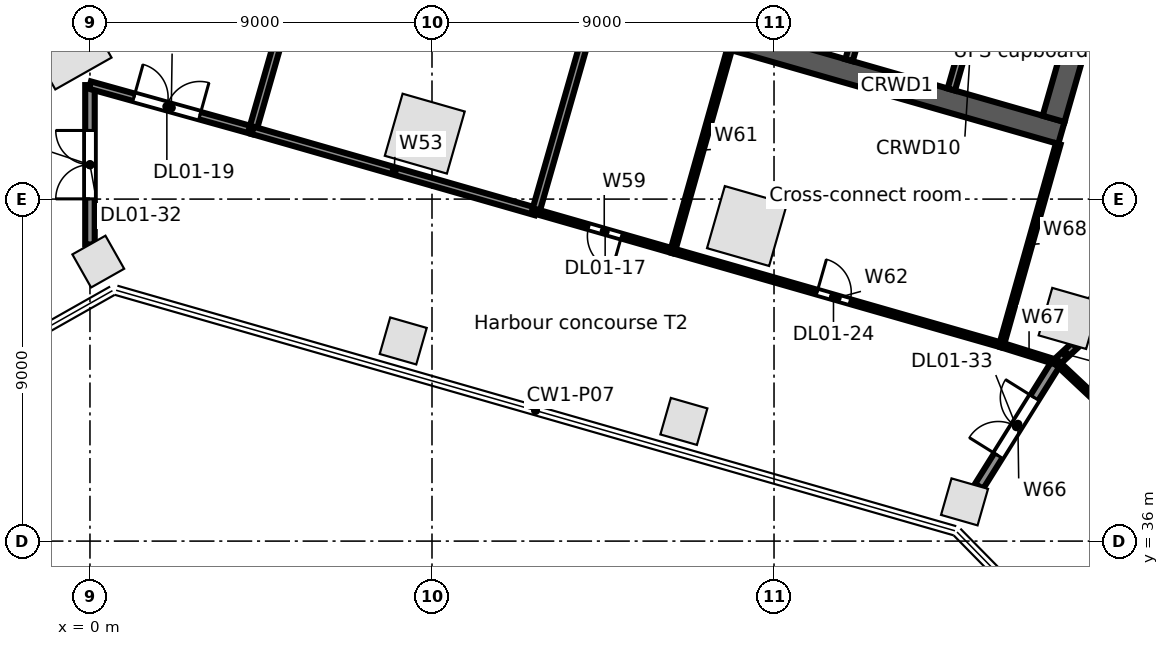
"""IFC4 building model, lengths in metres.
Left out: names, types, materials, properties, quantities, classifications, styles, units other than length and angle.
Written with IfcOpenShell. Run it as: python <this file> out.ifc"""

import sys

from ifc_helpers import new_model, si_unit, direction, frame, frame_2d, origin, origin_2d, place, context, subcontext, project, spatial, rectangle, extrude, element, fill, save


model = new_model("IFC4")
c1 = context("Model", 3, precision=1e-05, world=origin(), true_north=direction((0.0, 1.0)))
c2 = subcontext(c1, "Body", "Model", "MODEL_VIEW")
j1 = project(units=[si_unit("LENGTHUNIT", "METRE"), si_unit("PLANEANGLEUNIT", "RADIAN")], contexts=[c1])
p1 = place(None, origin())
s1 = spatial("IfcSite", under=j1, at=p1, CompositionType="ELEMENT")
p2 = place(p1, origin())
s2 = spatial("IfcBuilding", under=s1, at=p2, CompositionType="ELEMENT")
p3 = place(p2, frame((0.0, 0.0, 6.5)))
s3 = spatial("IfcBuildingStorey", under=s2, at=p3, CompositionType="ELEMENT", Elevation=6.5)
for number, where, z_axis, x_axis in (
    (1, (-0.591, 49.044, 0.0), (0.0, 0.0, 1.0), (0.87, 0.492, 0.0)),
    (2, (8.81, 46.722, 0.0), (0.0, 0.0, 1.0), (0.961, -0.276, 0.0)),
    (3, (17.288, 44.291, 0.0), (0.0, 0.0, 1.0), (0.961, -0.276, 0.0)),
):
    element("IfcColumn", number, at=place(p3, frame(where, z_axis=z_axis, x_axis=x_axis)), inside=s3, PredefinedType="COLUMN", context=c2, shape_type="SweptSolid", body=[
        extrude(rectangle(XDim=1.7, YDim=1.7, at=origin_2d()), origin(), (0.0, 0.0, 1.0), 5.0),
    ])
p4 = place(p3, frame((25.767, 41.86, 0.0), z_axis=(0.0, 0.0, 1.0), x_axis=(0.961261695938, -0.275637355817, 0.0)))
e4 = element("IfcColumn", 4, at=p4, inside=s3, PredefinedType="COLUMN", context=c2, shape_type="SweptSolid", body=[
    extrude(rectangle(XDim=1.3, YDim=1.3, at=origin_2d()), origin(), (0.0, 0.0, 1.0), 5.0),
])
for number, where, z_axis, x_axis in (
    (5, (0.219, 43.355, 0.0), (0.0, 0.0, 1.0), (0.87, 0.492, 0.0)),
    (6, (8.243, 41.267, 0.0), (0.0, 0.0, 1.0), (0.961, -0.276, 0.0)),
    (7, (15.628, 39.149, 0.0), (0.0, 0.0, 1.0), (0.961, -0.276, 0.0)),
    (8, (23.013, 37.032, 0.0), (0.0, 0.0, 1.0), (0.961, -0.276, 0.0)),
):
    element("IfcColumn", number, at=place(p3, frame(where, z_axis=z_axis, x_axis=x_axis)), inside=s3, PredefinedType="COLUMN", context=c2, shape_type="SweptSolid", body=[
        extrude(rectangle(XDim=1.0, YDim=1.0, at=origin_2d()), origin(), (0.0, 0.0, 1.0), 5.0),
    ])
p5 = place(p3, frame((16.911, 49.221, 0.0), z_axis=(0.0, 0.0, 1.0), x_axis=(0.96126248289, -0.275634611374, 0.0)))
e9 = element("IfcWall", 9, at=p5, inside=s3, PredefinedType="SOLIDWALL", context=c2, shape_type="SweptSolid", body=[
    extrude(rectangle(XDim=9.0, YDim=0.6, at=frame_2d((4.5, 0.0))), origin(), (0.0, 0.0, 1.0), 4.65),
])
p6 = place(p3, frame((19.973, 48.655, 0.0), z_axis=(0.0, 0.0, 1.0), x_axis=(0.275668441653, 0.961252781674, 0.0)))
e10 = element("IfcWall", 10, at=p6, inside=s3, PredefinedType="SOLIDWALL", context=c2, shape_type="SweptSolid", body=[
    extrude(rectangle(XDim=4.05, YDim=0.2, at=frame_2d((2.025, 0.0))), origin(), (0.0, 0.0, 1.0), 4.65),
])
p7 = place(p3, frame((22.665, 47.883, 0.0), z_axis=(0.0, 0.0, 1.0), x_axis=(0.275596769212, 0.961273333033, 0.0)))
e11 = element("IfcWall", 11, at=p7, inside=s3, PredefinedType="PARTITIONING", context=c2, shape_type="SweptSolid", body=[
    extrude(rectangle(XDim=4.05, YDim=0.2, at=frame_2d((2.025, 0.0))), origin(), (0.0, 0.0, 1.0), 4.65),
])
p8 = place(p3, frame((25.356, 47.112, 0.0), z_axis=(0.0, 0.0, 1.0), x_axis=(0.275631631629, 0.961263337304, 0.0)))
e12 = element("IfcWall", 12, at=p8, inside=s3, PredefinedType="SOLIDWALL", context=c2, shape_type="SweptSolid", body=[
    extrude(rectangle(XDim=10.8, YDim=0.6, at=frame_2d((5.4, 0.0))), origin(), (0.0, 0.0, 1.0), 4.65),
])
p9 = place(p8, frame((4.8, 0.0, 0.0)))
e13 = element("IfcOpeningElement", 13, at=p9, cuts=e12, PredefinedType="OPENING", context=c2, shape_type="SweptSolid", body=[
    extrude(rectangle(XDim=1.2, YDim=2.1, at=frame_2d((0.6, 1.05))), frame((0.0, 0.31, 0.0), z_axis=(0.0, -1.0, 0.0), x_axis=(1.0, 0.0, 0.0)), (0.0, 0.0, 1.0), 0.62),
])
p10 = place(p3, frame((0.0, 43.806, 0.0), z_axis=(0.0, 0.0, 1.0), x_axis=(0.0, 1.0, 0.0)))
e14 = element("IfcWall", 14, at=p10, inside=s3, PredefinedType="PARTITIONING", context=c2, shape_type="SweptSolid", body=[
    extrude(rectangle(XDim=4.194, YDim=0.25, at=frame_2d((2.097, 0.0))), origin(), (0.0, 0.0, 1.0), 3.712),
])
p11 = place(p10, frame((1.2, 0.0, 0.0)))
e15 = element("IfcOpeningElement", 15, at=p11, cuts=e14, PredefinedType="OPENING", context=c2, shape_type="SweptSolid", body=[
    extrude(rectangle(XDim=1.8, YDim=2.1, at=frame_2d((0.9, 1.05))), frame((0.0, 0.135, 0.0), z_axis=(0.0, -1.0, 0.0), x_axis=(1.0, 0.0, 0.0)), (0.0, 0.0, 1.0), 0.27),
])
p12 = place(p3, frame((0.0, 48.0, 0.0), z_axis=(0.0, 0.0, 1.0), x_axis=(0.963400508162, -0.268066150181, 0.0)))
e16 = element("IfcWall", 16, at=p12, inside=s3, PredefinedType="PARTITIONING", context=c2, shape_type="SweptSolid", body=[
    extrude(rectangle(XDim=4.443, YDim=0.2, at=frame_2d((2.221, 0.0))), origin(), (0.0, 0.0, 1.0), 4.65),
])
p13 = place(p12, frame((1.2, 0.0, 0.0)))
e17 = element("IfcOpeningElement", 17, at=p13, cuts=e16, PredefinedType="OPENING", context=c2, shape_type="SweptSolid", body=[
    extrude(rectangle(XDim=1.8, YDim=2.1, at=frame_2d((0.9, 1.05))), frame((0.0, 0.11, 0.0), z_axis=(0.0, -1.0, 0.0), x_axis=(1.0, 0.0, 0.0)), (0.0, 0.0, 1.0), 0.22),
])
p14 = place(p3, frame((4.28, 46.809, 0.0), z_axis=(0.0, 0.0, 1.0), x_axis=(0.275635044812, 0.961262358605, 0.0)))
e18 = element("IfcWall", 18, at=p14, inside=s3, PredefinedType="PARTITIONING", context=c2, shape_type="SweptSolid", body=[
    extrude(rectangle(XDim=11.5, YDim=0.2, at=frame_2d((5.75, 0.0))), origin(), (0.0, 0.0, 1.0), 3.712),
])
p15 = place(p3, frame((4.28, 46.809, 0.0), z_axis=(0.0, 0.0, 1.0), x_axis=(0.961270337968, -0.275607215693, 0.0)))
e19 = element("IfcWall", 19, at=p15, inside=s3, PredefinedType="PARTITIONING", context=c2, shape_type="SweptSolid", body=[
    extrude(rectangle(XDim=7.75, YDim=0.2, at=frame_2d((3.875, 0.0))), origin(), (0.0, 0.0, 1.0), 4.03),
])
p16 = place(p3, frame((11.73, 44.673, 0.0), z_axis=(0.0, 0.0, 1.0), x_axis=(0.275635044812, 0.961262358605, 0.0)))
e20 = element("IfcWall", 20, at=p16, inside=s3, PredefinedType="PARTITIONING", context=c2, shape_type="SweptSolid", body=[
    extrude(rectangle(XDim=11.5, YDim=0.2, at=frame_2d((5.75, 0.0))), origin(), (0.0, 0.0, 1.0), 3.712),
])
p17 = place(p16, frame((4.95, 0.0, 0.0)))
e21 = element("IfcOpeningElement", 21, at=p17, cuts=e20, PredefinedType="OPENING", context=c2, shape_type="SweptSolid", body=[
    extrude(rectangle(XDim=1.8, YDim=2.1, at=frame_2d((0.9, 1.05))), frame((0.0, 0.11, 0.0), z_axis=(0.0, -1.0, 0.0), x_axis=(1.0, 0.0, 0.0)), (0.0, 0.0, 1.0), 0.22),
])
p18 = place(p3, frame((11.73, 44.673, 0.0), z_axis=(0.0, 0.0, 1.0), x_axis=(0.961228613303, -0.275752702557, 0.0)))
e22 = element("IfcWall", 22, at=p18, inside=s3, PredefinedType="PARTITIONING", context=c2, shape_type="SweptSolid", body=[
    extrude(rectangle(XDim=3.75, YDim=0.125, at=frame_2d((1.875, 0.0))), origin(), (0.0, 0.0, 1.0), 4.65),
])
p19 = place(p18, frame((1.45, 0.0, 0.0)))
e23 = element("IfcOpeningElement", 23, at=p19, cuts=e22, PredefinedType="OPENING", context=c2, shape_type="SweptSolid", body=[
    extrude(rectangle(XDim=0.9, YDim=2.1, at=frame_2d((0.45, 1.05))), frame((0.0, 0.073, 0.0), z_axis=(0.0, -1.0, 0.0), x_axis=(1.0, 0.0, 0.0)), (0.0, 0.0, 1.0), 0.145),
])
p20 = place(p3, frame((15.335, 43.639, 0.0), z_axis=(0.0, 0.0, 1.0), x_axis=(0.271407455373, 0.962464541252, 0.0)))
e24 = element("IfcWall", 24, at=p20, inside=s3, PredefinedType="PARTITIONING", context=c2, shape_type="SweptSolid", body=[
    extrude(rectangle(XDim=5.501, YDim=0.125, at=frame_2d((2.75, 0.0))), origin(), (0.0, 0.0, 1.0), 3.93),
])
p21 = place(p3, frame((15.335, 43.639, 0.0), z_axis=(0.0, 0.0, 1.0), x_axis=(0.961281982754, -0.275566597455, 0.0)))
e25 = element("IfcWall", 25, at=p21, inside=s3, PredefinedType="PARTITIONING", context=c2, shape_type="SweptSolid", body=[
    extrude(rectangle(XDim=9.0, YDim=0.125, at=frame_2d((4.5, 0.0))), origin(), (0.0, 0.0, 1.0), 3.822),
])
p22 = place(p21, frame((3.95, 0.0, 0.0)))
e26 = element("IfcOpeningElement", 26, at=p22, cuts=e25, PredefinedType="OPENING", context=c2, shape_type="SweptSolid", body=[
    extrude(rectangle(XDim=0.9, YDim=2.1, at=frame_2d((0.45, 1.05))), frame((0.0, 0.073, 0.0), z_axis=(0.0, -1.0, 0.0), x_axis=(1.0, 0.0, 0.0)), (0.0, 0.0, 1.0), 0.145),
])
p23 = place(p3, frame((23.397, 37.442, 0.0), z_axis=(0.0, 0.0, 1.0), x_axis=(0.529805058875, 0.848119448893, 0.0)))
e27 = element("IfcWall", 27, at=p23, inside=s3, PredefinedType="PARTITIONING", context=c2, shape_type="SweptSolid", body=[
    extrude(rectangle(XDim=3.849, YDim=0.25, at=frame_2d((1.924, 0.0))), origin(), (0.0, 0.0, 1.0), 3.712),
])
p24 = place(p23, frame((0.95, 0.0, 0.0)))
e28 = element("IfcOpeningElement", 28, at=p24, cuts=e27, PredefinedType="OPENING", context=c2, shape_type="SweptSolid", body=[
    extrude(rectangle(XDim=1.8, YDim=2.1, at=frame_2d((0.9, 1.05))), frame((0.0, 0.135, 0.0), z_axis=(0.0, -1.0, 0.0), x_axis=(1.0, 0.0, 0.0)), (0.0, 0.0, 1.0), 0.27),
])
p25 = place(p3, frame((23.986, 41.159, 0.0), z_axis=(0.0, 0.0, 1.0), x_axis=(0.954522865266, -0.298137719325, 0.0)))
e29 = element("IfcWall", 29, at=p25, inside=s3, PredefinedType="PARTITIONING", context=c2, shape_type="SweptSolid", body=[
    extrude(rectangle(XDim=1.519, YDim=0.125, at=frame_2d((0.76, 0.0))), origin(), (0.0, 0.0, 1.0), 3.712),
])
p26 = place(p3, frame((23.986, 41.159, 0.0), z_axis=(0.0, 0.0, 1.0), x_axis=(0.271465437068, 0.962448188983, 0.0)))
e30 = element("IfcWall", 30, at=p26, inside=s3, PredefinedType="PARTITIONING", context=c2, shape_type="SweptSolid", body=[
    extrude(rectangle(XDim=5.5, YDim=0.125, at=frame_2d((2.75, 0.0))), origin(), (0.0, 0.0, 1.0), 3.93),
])
p27 = place(p3, frame((25.436, 40.706, 0.0), z_axis=(0.0, 0.0, 1.0), x_axis=(0.733725630695, 0.679445876329, 0.0)))
e31 = element("IfcWall", 31, at=p27, inside=s3, PredefinedType="PARTITIONING", context=c2, shape_type="SweptSolid", body=[
    extrude(rectangle(XDim=0.643, YDim=0.2, at=frame_2d((0.322, 0.0))), origin(), (0.0, 0.0, 1.0), 4.65),
])
p28 = place(p3, frame((25.436, 40.706, 0.0), z_axis=(0.0, 0.0, 1.0), x_axis=(0.729011488135, -0.684501461041, 0.0)))
e32 = element("IfcWall", 32, at=p28, inside=s3, PredefinedType="PARTITIONING", context=c2, shape_type="SweptSolid", body=[
    extrude(rectangle(XDim=4.202, YDim=0.125, at=frame_2d((2.101, 0.0))), origin(), (0.0, 0.0, 1.0), 4.65),
])
p29 = place(p28, frame((1.7, 0.0, 0.0)))
e33 = element("IfcOpeningElement", 33, at=p29, cuts=e32, PredefinedType="OPENING", context=c2, shape_type="SweptSolid", body=[
    extrude(rectangle(XDim=0.9, YDim=2.1, at=frame_2d((0.45, 1.05))), frame((0.0, 0.073, 0.0), z_axis=(0.0, -1.0, 0.0), x_axis=(1.0, 0.0, 0.0)), (0.0, 0.0, 1.0), 0.145),
])
p30 = place(p19, frame((0.9, 0.0, 0.0), z_axis=(0.0, 0.0, 1.0), x_axis=(-1.0, 0.0, 0.0)))
e34 = element("IfcDoor", 34, at=p30, inside=s3, OperationType="SINGLE_SWING_LEFT", PredefinedType="DOOR", context=c2, shape_type="SweptSolid", body=[
    extrude(rectangle(XDim=0.9, YDim=2.1, at=frame_2d((0.45, 1.05))), frame((0.0, 0.025, 0.0), z_axis=(0.0, -1.0, 0.0), x_axis=(1.0, 0.0, 0.0)), (0.0, 0.0, 1.0), 0.05),
])
fill(e23, e34)
p31 = place(p13, origin())
e35 = element("IfcDoor", 35, at=p31, inside=s3, OperationType="DOUBLE_DOOR_SINGLE_SWING", PredefinedType="DOOR", context=c2, shape_type="SweptSolid", body=[
    extrude(rectangle(XDim=1.8, YDim=2.1, at=frame_2d((0.9, 1.05))), frame((0.0, 0.025, 0.0), z_axis=(0.0, -1.0, 0.0), x_axis=(1.0, 0.0, 0.0)), (0.0, 0.0, 1.0), 0.05),
])
fill(e17, e35)
p32 = place(p22, origin())
e36 = element("IfcDoor", 36, at=p32, inside=s3, OperationType="SINGLE_SWING_LEFT", PredefinedType="DOOR", context=c2, shape_type="SweptSolid", body=[
    extrude(rectangle(XDim=0.9, YDim=2.1, at=frame_2d((0.45, 1.05))), frame((0.0, 0.025, 0.0), z_axis=(0.0, -1.0, 0.0), x_axis=(1.0, 0.0, 0.0)), (0.0, 0.0, 1.0), 0.05),
])
fill(e26, e36)
p33 = place(p11, origin())
e37 = element("IfcDoor", 37, at=p33, inside=s3, OperationType="DOUBLE_DOOR_SINGLE_SWING", PredefinedType="DOOR", context=c2, shape_type="SweptSolid", body=[
    extrude(rectangle(XDim=1.8, YDim=2.1, at=frame_2d((0.9, 1.05))), frame((0.0, 0.025, 0.0), z_axis=(0.0, -1.0, 0.0), x_axis=(1.0, 0.0, 0.0)), (0.0, 0.0, 1.0), 0.05),
])
fill(e15, e37)
p34 = place(p24, origin())
e38 = element("IfcDoor", 38, at=p34, inside=s3, OperationType="DOUBLE_DOOR_SINGLE_SWING", PredefinedType="DOOR", context=c2, shape_type="SweptSolid", body=[
    extrude(rectangle(XDim=1.8, YDim=2.1, at=frame_2d((0.9, 1.05))), frame((0.0, 0.025, 0.0), z_axis=(0.0, -1.0, 0.0), x_axis=(1.0, 0.0, 0.0)), (0.0, 0.0, 1.0), 0.05),
])
fill(e28, e38)
save(model, sys.argv[1])
